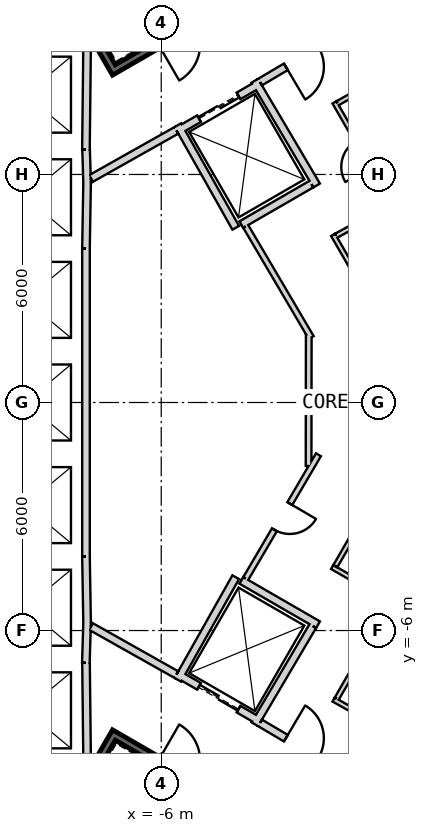
"""IFC4 building model, lengths in metres.
Left out: names, types, materials, properties, quantities, classifications, styles, units other than length and angle.
Written with IfcOpenShell. Run it as: python <this file> out.ifc"""

import sys

from ifc_helpers import new_model, si_unit, direction, frame, frame_2d, origin, place, context, subcontext, project, spatial, rectangle, extrude, element, fill, save


model = new_model("IFC4")
c1 = context("Model", 3, precision=1e-05, world=origin(), true_north=direction((0.0, 1.0)))
c2 = subcontext(c1, "Body", "Model", "MODEL_VIEW")
j1 = project(units=[si_unit("LENGTHUNIT", "METRE"), si_unit("PLANEANGLEUNIT", "RADIAN")], contexts=[c1])
p1 = place(None, origin())
s1 = spatial("IfcSite", under=j1, at=p1, CompositionType="ELEMENT")
p2 = place(p1, origin())
s2 = spatial("IfcBuilding", under=s1, at=p2, CompositionType="ELEMENT")
p3 = place(p2, frame((0.0, 0.0, 217.2)))
s3 = spatial("IfcBuildingStorey", under=s2, at=p3, CompositionType="ELEMENT", Elevation=217.2)
p4 = place(p3, frame((19.475, 2.208, 0.0), z_axis=(0.0, 0.0, 1.0), x_axis=(-0.866028369851, 0.499994862586, 0.0)))
e1 = element("IfcWall", 1, at=p4, inside=s3, PredefinedType="SHEAR", context=c2, shape_type="SweptSolid", body=[
    extrude(rectangle(XDim=31.523, YDim=0.9, at=frame_2d((15.762, 0.0))), origin(), (0.0, 0.0, 1.0), 4.0),
])
p5 = place(p4, frame((7.062, 0.0, 0.0)))
e2 = element("IfcOpeningElement", 2, at=p5, cuts=e1, PredefinedType="OPENING", context=c2, shape_type="SweptSolid", body=[
    extrude(rectangle(XDim=1.2, YDim=2.4, at=frame_2d((0.6, 1.2))), frame((0.0, 0.46, 0.0), z_axis=(0.0, -1.0, 0.0), x_axis=(1.0, 0.0, 0.0)), (0.0, 0.0, 1.0), 0.92),
])
p6 = place(p4, frame((3.612, 0.0, 0.0)))
e3 = element("IfcOpeningElement", 3, at=p6, cuts=e1, PredefinedType="OPENING", context=c2, shape_type="SweptSolid", body=[
    extrude(rectangle(XDim=1.2, YDim=2.4, at=frame_2d((0.6, 1.2))), frame((0.0, 0.46, 0.0), z_axis=(0.0, -1.0, 0.0), x_axis=(1.0, 0.0, 0.0)), (0.0, 0.0, 1.0), 0.92),
])
p7 = place(p4, frame((26.712, 0.0, 0.0)))
e4 = element("IfcOpeningElement", 4, at=p7, cuts=e1, PredefinedType="OPENING", context=c2, shape_type="SweptSolid", body=[
    extrude(rectangle(XDim=1.2, YDim=2.4, at=frame_2d((0.6, 1.2))), frame((0.0, 0.46, 0.0), z_axis=(0.0, -1.0, 0.0), x_axis=(1.0, 0.0, 0.0)), (0.0, 0.0, 1.0), 0.92),
])
p8 = place(p3, frame((-7.825, -17.97, 0.0), z_axis=(0.0, 0.0, 1.0), x_axis=(0.866028369851, 0.499994862586, 0.0)))
e5 = element("IfcWall", 5, at=p8, inside=s3, PredefinedType="SHEAR", context=c2, shape_type="SweptSolid", body=[
    extrude(rectangle(XDim=31.523, YDim=0.9, at=frame_2d((15.762, 0.0))), origin(), (0.0, 0.0, 1.0), 4.0),
])
p9 = place(p8, frame((7.062, 0.0, 0.0)))
e6 = element("IfcOpeningElement", 6, at=p9, cuts=e5, PredefinedType="OPENING", context=c2, shape_type="SweptSolid", body=[
    extrude(rectangle(XDim=1.2, YDim=2.4, at=frame_2d((0.6, 1.2))), frame((0.0, 0.46, 0.0), z_axis=(0.0, -1.0, 0.0), x_axis=(1.0, 0.0, 0.0)), (0.0, 0.0, 1.0), 0.92),
])
p10 = place(p8, frame((9.762, 0.0, 0.0)))
e7 = element("IfcOpeningElement", 7, at=p10, cuts=e5, PredefinedType="OPENING", context=c2, shape_type="SweptSolid", body=[
    extrude(rectangle(XDim=1.2, YDim=2.4, at=frame_2d((0.6, 1.2))), frame((0.0, 0.46, 0.0), z_axis=(0.0, -1.0, 0.0), x_axis=(1.0, 0.0, 0.0)), (0.0, 0.0, 1.0), 0.92),
])
p11 = place(p8, frame((12.462, 0.0, 0.0)))
e8 = element("IfcOpeningElement", 8, at=p11, cuts=e5, PredefinedType="OPENING", context=c2, shape_type="SweptSolid", body=[
    extrude(rectangle(XDim=1.2, YDim=2.4, at=frame_2d((0.6, 1.2))), frame((0.0, 0.46, 0.0), z_axis=(0.0, -1.0, 0.0), x_axis=(1.0, 0.0, 0.0)), (0.0, 0.0, 1.0), 0.92),
])
p12 = place(p8, frame((15.162, 0.0, 0.0)))
e9 = element("IfcOpeningElement", 9, at=p12, cuts=e5, PredefinedType="OPENING", context=c2, shape_type="SweptSolid", body=[
    extrude(rectangle(XDim=1.2, YDim=2.4, at=frame_2d((0.6, 1.2))), frame((0.0, 0.46, 0.0), z_axis=(0.0, -1.0, 0.0), x_axis=(1.0, 0.0, 0.0)), (0.0, 0.0, 1.0), 0.92),
])
p13 = place(p8, frame((17.862, 0.0, 0.0)))
e10 = element("IfcOpeningElement", 10, at=p13, cuts=e5, PredefinedType="OPENING", context=c2, shape_type="SweptSolid", body=[
    extrude(rectangle(XDim=1.2, YDim=2.4, at=frame_2d((0.6, 1.2))), frame((0.0, 0.46, 0.0), z_axis=(0.0, -1.0, 0.0), x_axis=(1.0, 0.0, 0.0)), (0.0, 0.0, 1.0), 0.92),
])
p14 = place(p8, frame((20.562, 0.0, 0.0)))
e11 = element("IfcOpeningElement", 11, at=p14, cuts=e5, PredefinedType="OPENING", context=c2, shape_type="SweptSolid", body=[
    extrude(rectangle(XDim=1.2, YDim=2.4, at=frame_2d((0.6, 1.2))), frame((0.0, 0.46, 0.0), z_axis=(0.0, -1.0, 0.0), x_axis=(1.0, 0.0, 0.0)), (0.0, 0.0, 1.0), 0.92),
])
p15 = place(p8, frame((26.712, 0.0, 0.0)))
e12 = element("IfcOpeningElement", 12, at=p15, cuts=e5, PredefinedType="OPENING", context=c2, shape_type="SweptSolid", body=[
    extrude(rectangle(XDim=1.2, YDim=2.4, at=frame_2d((0.6, 1.2))), frame((0.0, 0.46, 0.0), z_axis=(0.0, -1.0, 0.0), x_axis=(1.0, 0.0, 0.0)), (0.0, 0.0, 1.0), 0.92),
])
p16 = place(p8, frame((3.612, 0.0, 0.0)))
e13 = element("IfcOpeningElement", 13, at=p16, cuts=e5, PredefinedType="OPENING", context=c2, shape_type="SweptSolid", body=[
    extrude(rectangle(XDim=1.2, YDim=2.4, at=frame_2d((0.6, 1.2))), frame((0.0, 0.46, 0.0), z_axis=(0.0, -1.0, 0.0), x_axis=(1.0, 0.0, 0.0)), (0.0, 0.0, 1.0), 0.92),
])
p17 = place(p3, frame((-7.951, 9.35, 0.0), z_axis=(0.0, 0.0, 1.0), x_axis=(-0.011120469654, -0.999938165666, 0.0)))
e14 = element("IfcWall", 14, at=p17, inside=s3, PredefinedType="PLUMBINGWALL", context=c2, shape_type="SweptSolid", body=[
    extrude(rectangle(XDim=2.7, YDim=0.2, at=frame_2d((1.35, 0.0))), origin(), (0.0, 0.0, 1.0), 3.7),
])
p18 = place(p3, frame((-7.977, 6.65, 0.0), z_axis=(0.0, 0.0, 1.0), x_axis=(0.030861509705, -0.999523670164, 0.0)))
e15 = element("IfcWall", 15, at=p18, inside=s3, PredefinedType="PLUMBINGWALL", context=c2, shape_type="SweptSolid", body=[
    extrude(rectangle(XDim=0.878, YDim=0.2, at=frame_2d((0.439, 0.0))), origin(), (0.0, 0.0, 1.0), 3.7),
])
p19 = place(p3, frame((-7.949, 5.894, 0.0), z_axis=(0.0, 0.0, 1.0), x_axis=(-0.016809909365, -0.999858703491, 0.0)))
e16 = element("IfcWall", 16, at=p19, inside=s3, PredefinedType="PLUMBINGWALL", context=c2, shape_type="SweptSolid", body=[
    extrude(rectangle(XDim=1.844, YDim=0.2, at=frame_2d((0.922, 0.0))), origin(), (0.0, 0.0, 1.0), 3.7),
])
p20 = place(p3, frame((-7.98, 4.05, 0.0), z_axis=(0.0, 0.0, 1.0), x_axis=(0.0, -1.0, 0.0)))
e17 = element("IfcWall", 17, at=p20, inside=s3, PredefinedType="PLUMBINGWALL", context=c2, shape_type="SweptSolid", body=[
    extrude(rectangle(XDim=8.1, YDim=0.2, at=frame_2d((4.05, 0.0))), origin(), (0.0, 0.0, 1.0), 3.7),
])
p21 = place(p3, frame((-7.95, -5.772, 0.0), z_axis=(0.0, 0.0, 1.0), x_axis=(-0.030803413295, -0.999525462272, 0.0)))
e18 = element("IfcWall", 18, at=p21, inside=s3, PredefinedType="PLUMBINGWALL", context=c2, shape_type="SweptSolid", body=[
    extrude(rectangle(XDim=1.078, YDim=0.2, at=frame_2d((0.539, 0.0))), origin(), (0.0, 0.0, 1.0), 3.7),
])
p22 = place(p3, frame((-7.98, -4.05, 0.0), z_axis=(0.0, 0.0, 1.0), x_axis=(0.016809909365, -0.999858703491, 0.0)))
e19 = element("IfcWall", 19, at=p22, inside=s3, PredefinedType="PLUMBINGWALL", context=c2, shape_type="SweptSolid", body=[
    extrude(rectangle(XDim=1.844, YDim=0.2, at=frame_2d((0.922, 0.0))), origin(), (0.0, 0.0, 1.0), 3.7),
])
p23 = place(p3, frame((-7.979, -6.85, 0.0), z_axis=(0.0, 0.0, 1.0), x_axis=(0.011121475088, -0.999938154483, 0.0)))
e20 = element("IfcWall", 20, at=p23, inside=s3, PredefinedType="PLUMBINGWALL", context=c2, shape_type="SweptSolid", body=[
    extrude(rectangle(XDim=2.7, YDim=0.2, at=frame_2d((1.35, 0.0))), origin(), (0.0, 0.0, 1.0), 3.7),
])
p24 = place(p3, frame((-1.13, -9.832, 0.0), z_axis=(0.0, 0.0, 1.0), x_axis=(0.871988740738, 0.489525929882, 0.0)))
e21 = element("IfcWall", 21, at=p24, inside=s3, PredefinedType="PLUMBINGWALL", context=c2, shape_type="SweptSolid", body=[
    extrude(rectangle(XDim=1.845, YDim=0.2, at=frame_2d((0.922, 0.0))), origin(), (0.0, 0.0, 1.0), 3.7),
])
p25 = place(p3, frame((-11.245, 15.678, -0.3), z_axis=(0.0, 0.0, 1.0), x_axis=(0.499977274689, -0.866038523851, 0.0)))
e22 = element("IfcWall", 22, at=p25, inside=s3, PredefinedType="SHEAR", context=c2, shape_type="SweptSolid", body=[
    extrude(rectangle(XDim=8.1, YDim=0.2, at=frame_2d((4.05, 0.0))), origin(), (0.0, 0.0, 1.0), 4.0),
])
p26 = place(p3, frame((-7.159, 8.8, -0.3), z_axis=(0.0, 0.0, 1.0), x_axis=(0.866047807691, 0.499961193289, 0.0)))
e23 = element("IfcWall", 23, at=p26, inside=s3, PredefinedType="SHEAR", context=c2, shape_type="SweptSolid", body=[
    extrude(rectangle(XDim=3.6, YDim=0.2, at=frame_2d((1.8, 0.0))), origin(), (0.0, 0.0, 1.0), 4.0),
])
p27 = place(p26, frame((1.25, 0.0, 0.3)))
e24 = element("IfcOpeningElement", 24, at=p27, cuts=e23, PredefinedType="OPENING", context=c2, shape_type="SweptSolid", body=[
    extrude(rectangle(XDim=1.1, YDim=2.1, at=frame_2d((0.55, 1.05))), frame((0.0, 0.11, 0.0), z_axis=(0.0, -1.0, 0.0), x_axis=(1.0, 0.0, 0.0)), (0.0, 0.0, 1.0), 0.22),
])
p28 = place(p3, frame((-5.524, 7.168, 0.0), z_axis=(0.0, 0.0, 1.0), x_axis=(0.866024647952, 0.500001309137, 0.0)))
e25 = element("IfcWall", 25, at=p28, inside=s3, PredefinedType="PLUMBINGWALL", context=c2, shape_type="SweptSolid", body=[
    extrude(rectangle(XDim=2.4, YDim=0.2, at=frame_2d((1.2, 0.0))), origin(), (0.0, 0.0, 1.0), 3.7),
])
p29 = place(p28, frame((0.6, 0.0, 0.0)))
e26 = element("IfcOpeningElement", 26, at=p29, cuts=e25, PredefinedType="OPENING", context=c2, shape_type="SweptSolid", body=[
    extrude(rectangle(XDim=1.2, YDim=2.4, at=frame_2d((0.6, 1.2))), frame((0.0, 0.11, 0.0), z_axis=(0.0, -1.0, 0.0), x_axis=(1.0, 0.0, 0.0)), (0.0, 0.0, 1.0), 0.22),
])
p30 = place(p3, frame((-4.039, 4.596, 0.0), z_axis=(0.0, 0.0, 1.0), x_axis=(-0.491322718731, 0.870977603649, 0.0)))
e27 = element("IfcWall", 27, at=p30, inside=s3, PredefinedType="PLUMBINGWALL", context=c2, shape_type="SweptSolid", body=[
    extrude(rectangle(XDim=3.1, YDim=0.2, at=frame_2d((1.55, 0.0))), origin(), (0.0, 0.0, 1.0), 3.7),
])
p31 = place(p3, frame((-3.538, 8.465, 0.0), z_axis=(0.0, 0.0, 1.0), x_axis=(0.508616218331, -0.860993346345, 0.0)))
e28 = element("IfcWall", 28, at=p31, inside=s3, PredefinedType="PLUMBINGWALL", context=c2, shape_type="SweptSolid", body=[
    extrude(rectangle(XDim=3.2, YDim=0.2, at=frame_2d((1.6, 0.0))), origin(), (0.0, 0.0, 1.0), 3.7),
])
p32 = place(p3, frame((-2.047, 5.746, 0.0), z_axis=(0.0, 0.0, 1.0), x_axis=(-0.866040491692, -0.499973866067, 0.0)))
e29 = element("IfcWall", 29, at=p32, inside=s3, PredefinedType="PLUMBINGWALL", context=c2, shape_type="SweptSolid", body=[
    extrude(rectangle(XDim=2.129, YDim=0.2, at=frame_2d((1.065, 0.0))), origin(), (0.0, 0.0, 1.0), 3.7),
])
p33 = place(p3, frame((-7.196, -8.663, -0.3), z_axis=(0.0, 0.0, 1.0), x_axis=(-0.499997992926, -0.866026562566, 0.0)))
e30 = element("IfcWall", 30, at=p33, inside=s3, PredefinedType="SHEAR", context=c2, shape_type="SweptSolid", body=[
    extrude(rectangle(XDim=7.9, YDim=0.2, at=frame_2d((3.95, 0.0))), origin(), (0.0, 0.0, 1.0), 4.0),
])
p34 = place(p3, frame((-4.041, -10.599, -0.3), z_axis=(0.0, 0.0, 1.0), x_axis=(-0.866047807691, 0.499961193289, 0.0)))
e31 = element("IfcWall", 31, at=p34, inside=s3, PredefinedType="SHEAR", context=c2, shape_type="SweptSolid", body=[
    extrude(rectangle(XDim=3.6, YDim=0.2, at=frame_2d((1.8, 0.0))), origin(), (0.0, 0.0, 1.0), 4.0),
])
p35 = place(p34, frame((1.25, 0.0, 0.3)))
e32 = element("IfcOpeningElement", 32, at=p35, cuts=e31, PredefinedType="OPENING", context=c2, shape_type="SweptSolid", body=[
    extrude(rectangle(XDim=1.1, YDim=2.1, at=frame_2d((0.55, 1.05))), frame((0.0, 0.11, 0.0), z_axis=(0.0, -1.0, 0.0), x_axis=(1.0, 0.0, 0.0)), (0.0, 0.0, 1.0), 0.22),
])
p36 = place(p3, frame((-3.446, -8.368, 0.0), z_axis=(0.0, 0.0, 1.0), x_axis=(-0.866024647952, 0.500001309137, 0.0)))
e33 = element("IfcWall", 33, at=p36, inside=s3, PredefinedType="PLUMBINGWALL", context=c2, shape_type="SweptSolid", body=[
    extrude(rectangle(XDim=2.4, YDim=0.2, at=frame_2d((1.2, 0.0))), origin(), (0.0, 0.0, 1.0), 3.7),
])
p37 = place(p36, frame((0.6, 0.0, 0.0)))
e34 = element("IfcOpeningElement", 34, at=p37, cuts=e33, PredefinedType="OPENING", context=c2, shape_type="SweptSolid", body=[
    extrude(rectangle(XDim=1.2, YDim=2.4, at=frame_2d((0.6, 1.2))), frame((0.0, 0.11, 0.0), z_axis=(0.0, -1.0, 0.0), x_axis=(1.0, 0.0, 0.0)), (0.0, 0.0, 1.0), 0.22),
])
p38 = place(p3, frame((-5.562, -7.296, 0.0), z_axis=(0.0, 0.0, 1.0), x_axis=(0.491322718731, 0.870977603649, 0.0)))
e35 = element("IfcWall", 35, at=p38, inside=s3, PredefinedType="PLUMBINGWALL", context=c2, shape_type="SweptSolid", body=[
    extrude(rectangle(XDim=3.1, YDim=0.2, at=frame_2d((1.55, 0.0))), origin(), (0.0, 0.0, 1.0), 3.7),
])
p39 = place(p3, frame((-3.892, -4.681, 0.0), z_axis=(0.0, 0.0, 1.0), x_axis=(0.866009305107, -0.50002788269, 0.0)))
e36 = element("IfcWall", 36, at=p39, inside=s3, PredefinedType="PLUMBINGWALL", context=c2, shape_type="SweptSolid", body=[
    extrude(rectangle(XDim=2.329, YDim=0.2, at=frame_2d((1.165, 0.0))), origin(), (0.0, 0.0, 1.0), 3.7),
])
p40 = place(p3, frame((-2.012, -5.882, 0.0), z_axis=(0.0, 0.0, 1.0), x_axis=(-0.508619639323, -0.860991325447, 0.0)))
e37 = element("IfcWall", 37, at=p40, inside=s3, PredefinedType="PLUMBINGWALL", context=c2, shape_type="SweptSolid", body=[
    extrude(rectangle(XDim=3.0, YDim=0.2, at=frame_2d((1.5, 0.0))), origin(), (0.0, 0.0, 1.0), 3.7),
])
p41 = place(p3, frame((-5.6, 7.16, 0.0), z_axis=(0.0, 0.0, 1.0), x_axis=(-0.871340486379, -0.490678873396, 0.0)))
e38 = element("IfcWall", 38, at=p41, inside=s3, PredefinedType="PARTITIONING", context=c2, shape_type="SweptSolid", body=[
    extrude(rectangle(XDim=2.581, YDim=0.2, at=frame_2d((1.291, 0.0))), origin(), (0.0, 0.0, 1.0), 3.7),
])
p42 = place(p3, frame((-1.179, 9.745, 0.0), z_axis=(0.0, 0.0, 1.0), x_axis=(-0.860630814782, -0.509229418482, 0.0)))
e39 = element("IfcWall", 39, at=p42, inside=s3, PredefinedType="PARTITIONING", context=c2, shape_type="SweptSolid", body=[
    extrude(rectangle(XDim=2.582, YDim=0.2, at=frame_2d((1.291, 0.0))), origin(), (0.0, 0.0, 1.0), 3.7),
])
p43 = place(p42, frame((0.791, 0.0, 0.0)))
e40 = element("IfcOpeningElement", 40, at=p43, cuts=e39, PredefinedType="OPENING", context=c2, shape_type="SweptSolid", body=[
    extrude(rectangle(XDim=1.0, YDim=2.1, at=frame_2d((0.5, 1.05))), frame((0.0, 0.11, 0.0), z_axis=(0.0, -1.0, 0.0), x_axis=(1.0, 0.0, 0.0)), (0.0, 0.0, 1.0), 0.22),
])
p44 = place(p3, frame((-7.849, -5.894, 0.0), z_axis=(0.0, 0.0, 1.0), x_axis=(0.871340486379, -0.490678873396, 0.0)))
e41 = element("IfcWall", 41, at=p44, inside=s3, PredefinedType="PARTITIONING", context=c2, shape_type="SweptSolid", body=[
    extrude(rectangle(XDim=2.581, YDim=0.2, at=frame_2d((1.291, 0.0))), origin(), (0.0, 0.0, 1.0), 3.7),
])
p45 = place(p3, frame((-3.401, -8.43, 0.0), z_axis=(0.0, 0.0, 1.0), x_axis=(0.860598681535, -0.509283721849, 0.0)))
e42 = element("IfcWall", 42, at=p45, inside=s3, PredefinedType="PARTITIONING", context=c2, shape_type="SweptSolid", body=[
    extrude(rectangle(XDim=2.581, YDim=0.2, at=frame_2d((1.291, 0.0))), origin(), (0.0, 0.0, 1.0), 3.7),
])
p46 = place(p45, frame((0.791, 0.0, 0.0)))
e43 = element("IfcOpeningElement", 43, at=p46, cuts=e42, PredefinedType="OPENING", context=c2, shape_type="SweptSolid", body=[
    extrude(rectangle(XDim=1.0, YDim=2.1, at=frame_2d((0.5, 1.05))), frame((0.0, 0.11, 0.0), z_axis=(0.0, -1.0, 0.0), x_axis=(1.0, 0.0, 0.0)), (0.0, 0.0, 1.0), 0.22),
])
p47 = place(p3, frame((-2.053, 1.709, 0.0), z_axis=(0.0, 0.0, 1.0), x_axis=(-0.507570243425, 0.861610380618, 0.0)))
e44 = element("IfcWall", 44, at=p47, inside=s3, PredefinedType="PLUMBINGWALL", context=c2, shape_type="SweptSolid", body=[
    extrude(rectangle(XDim=3.394, YDim=0.15, at=frame_2d((1.697, 0.0))), origin(), (0.0, 0.0, 1.0), 3.7),
])
p48 = place(p3, frame((-2.122, -1.67, 0.0), z_axis=(0.0, 0.0, 1.0), x_axis=(0.00126831916, 0.999999195683, 0.0)))
e45 = element("IfcWall", 45, at=p48, inside=s3, PredefinedType="PLUMBINGWALL", context=c2, shape_type="SweptSolid", body=[
    extrude(rectangle(XDim=3.465, YDim=0.15, at=frame_2d((1.732, 0.0))), origin(), (0.0, 0.0, 1.0), 3.7),
])
p49 = place(p3, frame((-3.776, -4.633, 0.0), z_axis=(0.0, 0.0, 1.0), x_axis=(0.506548448152, 0.862211499387, 0.0)))
e46 = element("IfcWall", 46, at=p49, inside=s3, PredefinedType="PLUMBINGWALL", context=c2, shape_type="SweptSolid", body=[
    extrude(rectangle(XDim=3.778, YDim=0.15, at=frame_2d((1.889, 0.0))), origin(), (0.0, 0.0, 1.0), 3.7),
])
p50 = place(p49, frame((1.489, 0.0, 0.0)))
e47 = element("IfcOpeningElement", 47, at=p50, cuts=e46, PredefinedType="OPENING", context=c2, shape_type="SweptSolid", body=[
    extrude(rectangle(XDim=0.8, YDim=2.1, at=frame_2d((0.4, 1.05))), frame((0.0, 0.085, 0.0), z_axis=(0.0, -1.0, 0.0), x_axis=(1.0, 0.0, 0.0)), (0.0, 0.0, 1.0), 0.17),
])
p51 = place(p3, frame((-1.464, -7.816, 0.0), z_axis=(0.0, 0.0, 1.0), x_axis=(0.871880202732, -0.489719217597, 0.0)))
e48 = element("IfcWall", 48, at=p51, inside=s3, PredefinedType="PARTITIONING", context=c2, shape_type="SweptSolid", body=[
    extrude(rectangle(XDim=2.224, YDim=0.12, at=frame_2d((1.112, 0.0))), origin(), (0.0, 0.0, 1.0), 3.7),
])
p52 = place(p3, frame((0.118, -5.195, 0.0), z_axis=(0.0, 0.0, 1.0), x_axis=(-0.499990139034, -0.866031096941, 0.0)))
e49 = element("IfcWall", 49, at=p52, inside=s3, PredefinedType="PARTITIONING", context=c2, shape_type="SweptSolid", body=[
    extrude(rectangle(XDim=3.0, YDim=0.12, at=frame_2d((1.5, 0.0))), origin(), (0.0, 0.0, 1.0), 3.7),
])
p53 = place(p3, frame((-1.501, -4.33, 0.0), z_axis=(0.0, 0.0, 1.0), x_axis=(0.866059624469, -0.499940723351, 0.0)))
e50 = element("IfcWall", 50, at=p53, inside=s3, PredefinedType="PARTITIONING", context=c2, shape_type="SweptSolid", body=[
    extrude(rectangle(XDim=1.775, YDim=0.12, at=frame_2d((0.888, 0.0))), origin(), (0.0, 0.0, 1.0), 3.7),
])
p54 = place(p3, frame((-0.26, -2.3, 0.0), z_axis=(0.0, 0.0, 1.0), x_axis=(-0.500035443578, -0.866004939458, 0.0)))
e51 = element("IfcWall", 51, at=p54, inside=s3, PredefinedType="PARTITIONING", context=c2, shape_type="SweptSolid", body=[
    extrude(rectangle(XDim=2.318, YDim=0.12, at=frame_2d((1.159, 0.0))), origin(), (0.0, 0.0, 1.0), 3.7),
])
p55 = place(p3, frame((-1.479, 4.412, 0.0), z_axis=(0.0, 0.0, 1.0), x_axis=(0.50003736129, -0.866003832159, 0.0)))
e52 = element("IfcWall", 52, at=p55, inside=s3, PredefinedType="PARTITIONING", context=c2, shape_type="SweptSolid", body=[
    extrude(rectangle(XDim=2.438, YDim=0.12, at=frame_2d((1.219, 0.0))), origin(), (0.0, 0.0, 1.0), 3.7),
])
p56 = place(p3, frame((-0.295, 4.992, 0.0), z_axis=(0.0, 0.0, 1.0), x_axis=(-0.87699482268, -0.480499824134, 0.0)))
e53 = element("IfcWall", 53, at=p56, inside=s3, PredefinedType="PARTITIONING", context=c2, shape_type="SweptSolid", body=[
    extrude(rectangle(XDim=1.256, YDim=0.12, at=frame_2d((0.628, 0.0))), origin(), (0.0, 0.0, 1.0), 3.7),
])
p57 = place(p3, frame((-1.442, 7.897, 0.0), z_axis=(0.0, 0.0, 1.0), x_axis=(0.499991792115, -0.866030142557, 0.0)))
e54 = element("IfcWall", 54, at=p57, inside=s3, PredefinedType="PARTITIONING", context=c2, shape_type="SweptSolid", body=[
    extrude(rectangle(XDim=3.06, YDim=0.12, at=frame_2d((1.53, 0.0))), origin(), (0.0, 0.0, 1.0), 3.7),
])
p58 = place(p57, frame((1.16, 0.0, 0.0)))
e55 = element("IfcOpeningElement", 55, at=p58, cuts=e54, PredefinedType="OPENING", context=c2, shape_type="SweptSolid", body=[
    extrude(rectangle(XDim=0.8, YDim=2.1, at=frame_2d((0.4, 1.05))), frame((0.0, 0.07, 0.0), z_axis=(0.0, -1.0, 0.0), x_axis=(1.0, 0.0, 0.0)), (0.0, 0.0, 1.0), 0.14),
])
p59 = place(p3, frame((0.414, 8.871, 0.0), z_axis=(0.0, 0.0, 1.0), x_axis=(-0.871809386997, -0.48984527429, 0.0)))
e56 = element("IfcWall", 56, at=p59, inside=s3, PredefinedType="PARTITIONING", context=c2, shape_type="SweptSolid", body=[
    extrude(rectangle(XDim=2.034, YDim=0.12, at=frame_2d((1.017, 0.0))), origin(), (0.0, 0.0, 1.0), 3.7),
])
p60 = place(p43, origin())
e57 = element("IfcDoor", 57, at=p60, inside=s3, OperationType="SINGLE_SWING_LEFT", PredefinedType="USERDEFINED", context=c2, shape_type="SweptSolid", body=[
    extrude(rectangle(XDim=1.0, YDim=2.1, at=frame_2d((0.5, 1.05))), frame((0.0, 0.025, 0.0), z_axis=(0.0, -1.0, 0.0), x_axis=(1.0, 0.0, 0.0)), (0.0, 0.0, 1.0), 0.05),
])
fill(e40, e57)
p61 = place(p29, origin())
e58 = element("IfcDoor", 58, at=p61, inside=s3, OperationType="SLIDING_TO_LEFT", PredefinedType="USERDEFINED", context=c2, shape_type="SweptSolid", body=[
    extrude(rectangle(XDim=1.2, YDim=2.4, at=frame_2d((0.6, 1.2))), frame((0.0, 0.025, 0.0), z_axis=(0.0, -1.0, 0.0), x_axis=(1.0, 0.0, 0.0)), (0.0, 0.0, 1.0), 0.05),
])
fill(e26, e58)
p62 = place(p46, origin())
e59 = element("IfcDoor", 59, at=p62, inside=s3, OperationType="SINGLE_SWING_LEFT", PredefinedType="USERDEFINED", context=c2, shape_type="SweptSolid", body=[
    extrude(rectangle(XDim=1.0, YDim=2.1, at=frame_2d((0.5, 1.05))), frame((0.0, 0.025, 0.0), z_axis=(0.0, -1.0, 0.0), x_axis=(1.0, 0.0, 0.0)), (0.0, 0.0, 1.0), 0.05),
])
fill(e43, e59)
p63 = place(p37, origin())
e60 = element("IfcDoor", 60, at=p63, inside=s3, OperationType="SLIDING_TO_LEFT", PredefinedType="USERDEFINED", context=c2, shape_type="SweptSolid", body=[
    extrude(rectangle(XDim=1.2, YDim=2.4, at=frame_2d((0.6, 1.2))), frame((0.0, 0.025, 0.0), z_axis=(0.0, -1.0, 0.0), x_axis=(1.0, 0.0, 0.0)), (0.0, 0.0, 1.0), 0.05),
])
fill(e34, e60)
p64 = place(p50, origin())
e61 = element("IfcDoor", 61, at=p64, inside=s3, OperationType="SINGLE_SWING_LEFT", PredefinedType="USERDEFINED", context=c2, shape_type="SweptSolid", body=[
    extrude(rectangle(XDim=0.8, YDim=2.1, at=frame_2d((0.4, 1.05))), frame((0.0, 0.025, 0.0), z_axis=(0.0, -1.0, 0.0), x_axis=(1.0, 0.0, 0.0)), (0.0, 0.0, 1.0), 0.05),
])
fill(e47, e61)
save(model, sys.argv[1])
